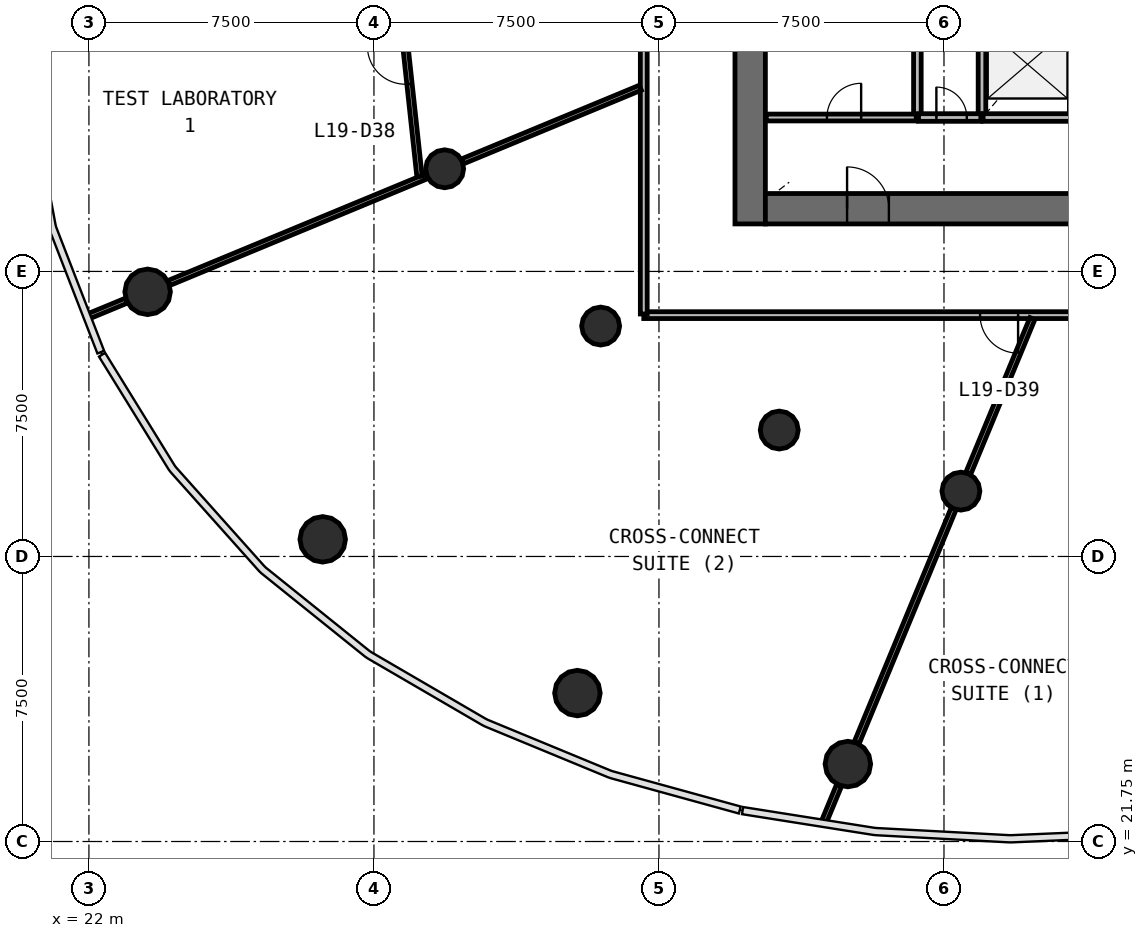
"""IFC4 building model, lengths in metres.
Left out: names, types, materials, properties, quantities, classifications, styles, units other than length and angle.
Written with IfcOpenShell. Run it as: python <this file> out.ifc"""

import sys

from ifc_helpers import new_model, si_unit, direction, frame, frame_2d, origin, origin_2d, place, context, subcontext, project, spatial, rectangle, circle, extrude, source, transform, mapped, element, fill, save


model = new_model("IFC4")
c1 = context("Model", 3, precision=1e-05, world=origin(), true_north=direction((0.0, 1.0)))
c2 = subcontext(c1, "Body", "Model", "MODEL_VIEW")
j1 = project(units=[si_unit("LENGTHUNIT", "METRE"), si_unit("PLANEANGLEUNIT", "RADIAN")], contexts=[c1])
p1 = place(None, origin())
s1 = spatial("IfcSite", under=j1, at=p1, CompositionType="ELEMENT")
p2 = place(p1, origin())
s2 = spatial("IfcBuilding", under=s1, at=p2, CompositionType="ELEMENT")
p3 = place(p2, frame((0.0, 0.0, 83.9)))
s3 = spatial("IfcBuildingStorey", under=s2, at=p3, CompositionType="ELEMENT", Elevation=83.9)
p4 = place(p3, frame((39.4, 58.0, 0.0), z_axis=(0.0, 0.0, 1.0), x_axis=(0.0, -1.0, 0.0)))
e1 = element("IfcWall", 1, at=p4, inside=s3, PredefinedType="SHEAR", context=c2, shape_type="SweptSolid", body=[
    extrude(rectangle(XDim=20.0, YDim=0.8, at=frame_2d((10.0, 0.0))), origin(), (0.0, 0.0, 1.0), 4.1),
])
p5 = place(p4, frame((9.1, 0.0, 0.0)))
e2 = element("IfcOpeningElement", 2, at=p5, cuts=e1, PredefinedType="OPENING", context=c2, shape_type="SweptSolid", body=[
    extrude(rectangle(XDim=1.8, YDim=2.1, at=frame_2d((0.9, 1.05))), frame((0.0, 0.41, 0.0), z_axis=(0.0, -1.0, 0.0), x_axis=(1.0, 0.0, 0.0)), (0.0, 0.0, 1.0), 0.82),
])
p6 = place(p3, frame((39.8, 38.4, 0.0), z_axis=(0.0, 0.0, 1.0), x_axis=(1.0, 0.0, 0.0)))
e3 = element("IfcWall", 3, at=p6, inside=s3, PredefinedType="SHEAR", context=c2, shape_type="SweptSolid", body=[
    extrude(rectangle(XDim=24.4, YDim=0.8, at=frame_2d((12.2, 0.0))), origin(), (0.0, 0.0, 1.0), 4.1),
])
p7 = place(p6, frame((21.65, 0.0, 0.0)))
e4 = element("IfcOpeningElement", 4, at=p7, cuts=e3, PredefinedType="OPENING", context=c2, shape_type="SweptSolid", body=[
    extrude(rectangle(XDim=1.1, YDim=2.1, at=frame_2d((0.55, 1.05))), frame((0.0, 0.41, 0.0), z_axis=(0.0, -1.0, 0.0), x_axis=(1.0, 0.0, 0.0)), (0.0, 0.0, 1.0), 0.82),
])
p8 = place(p6, frame((2.15, 0.0, 0.0)))
e5 = element("IfcOpeningElement", 5, at=p8, cuts=e3, PredefinedType="OPENING", context=c2, shape_type="SweptSolid", body=[
    extrude(rectangle(XDim=1.1, YDim=2.1, at=frame_2d((0.55, 1.05))), frame((0.0, 0.41, 0.0), z_axis=(0.0, -1.0, 0.0), x_axis=(1.0, 0.0, 0.0)), (0.0, 0.0, 1.0), 0.82),
])
m1 = source(origin(), c2, "Body", "SweptSolid", [
    extrude(circle(Radius=0.6, at=origin_2d()), origin(), (0.0, 0.0, 1.0), 4.1),
])
for number, where, z_axis, x_axis in (
    (6, (23.544, 36.213, 0.0), (0.0, 0.0, 1.0), (1.0, 0.0, 0.0)),
    (7, (28.152, 29.701, 0.0), (0.0, 0.0, 1.0), (1.0, 0.0, 0.0)),
    (8, (34.854, 25.655, 0.0), (0.0, 0.0, 1.0), (1.0, 0.0, 0.0)),
    (9, (41.971, 23.788, 0.0), (0.0, 0.0, 1.0), (1.0, 0.0, 0.0)),
):
    element("IfcColumn", number, at=place(p3, frame(where, z_axis=z_axis, x_axis=x_axis)), inside=s3, PredefinedType="COLUMN", context=c2, shape_type="MappedRepresentation", body=[
        mapped(m1, transform((0.0, 0.0, 0.0), scale=1.0)),
    ])
m2 = source(origin(), c2, "Body", "SweptSolid", [
    extrude(circle(Radius=0.5, at=origin_2d()), origin(), (0.0, 0.0, 1.0), 4.1),
])
for number, where, z_axis, x_axis in (
    (10, (31.361, 39.451, 0.0), (0.0, 0.0, 1.0), (1.0, 0.0, 0.0)),
    (11, (35.465, 35.312, 0.0), (0.0, 0.0, 1.0), (1.0, 0.0, 0.0)),
    (12, (40.165, 32.576, 0.0), (0.0, 0.0, 1.0), (1.0, 0.0, 0.0)),
    (13, (44.945, 30.969, 0.0), (0.0, 0.0, 1.0), (1.0, 0.0, 0.0)),
):
    element("IfcColumn", number, at=place(p3, frame(where, z_axis=z_axis, x_axis=x_axis)), inside=s3, PredefinedType="COLUMN", context=c2, shape_type="MappedRepresentation", body=[
        mapped(m2, transform((0.0, 0.0, 0.0), scale=1.0)),
    ])
for number, where, z_axis, x_axis in (
    (14, (43.8, 43.6, 0.0), (0.0, 0.0, 1.0), (0.0, -1.0, 0.0)),
    (15, (45.5, 43.6, 0.0), (0.0, 0.0, 1.0), (0.0, -1.0, 0.0)),
):
    element("IfcWall", number, at=place(p3, frame(where, z_axis=z_axis, x_axis=x_axis)), inside=s3, PredefinedType="SOLIDWALL", context=c2, shape_type="SweptSolid", body=[
        extrude(rectangle(XDim=2.8, YDim=0.2, at=frame_2d((1.4, 0.0))), origin(), (0.0, 0.0, 1.0), 3.7),
    ])
p9 = place(p3, frame((45.53, 40.8, 0.0), z_axis=(0.0, 0.0, 1.0), x_axis=(1.0, 0.0, 0.0)))
e16 = element("IfcWall", 16, at=p9, inside=s3, PredefinedType="SOLIDWALL", context=c2, shape_type="SweptSolid", body=[
    extrude(rectangle(XDim=2.34, YDim=0.2, at=frame_2d((1.17, 0.0))), origin(), (0.0, 0.0, 1.0), 3.7),
])
p10 = place(p3, frame((43.83, 40.8, 0.0), z_axis=(0.0, 0.0, 1.0), x_axis=(1.0, 0.0, 0.0)))
e17 = element("IfcWall", 17, at=p10, inside=s3, PredefinedType="SOLIDWALL", context=c2, shape_type="SweptSolid", body=[
    extrude(rectangle(XDim=1.64, YDim=0.2, at=frame_2d((0.82, 0.0))), origin(), (0.0, 0.0, 1.0), 3.7),
])
p11 = place(p10, frame((0.47, 0.0, 0.0)))
e18 = element("IfcOpeningElement", 18, at=p11, cuts=e17, PredefinedType="OPENING", context=c2, shape_type="SweptSolid", body=[
    extrude(rectangle(XDim=0.8, YDim=2.1, at=frame_2d((0.4, 1.05))), frame((0.0, 0.11, 0.0), z_axis=(0.0, -1.0, 0.0), x_axis=(1.0, 0.0, 0.0)), (0.0, 0.0, 1.0), 0.22),
])
p12 = place(p3, frame((67.4, 35.6, 0.0), z_axis=(0.0, 0.0, 1.0), x_axis=(-1.0, 0.0, 0.0)))
e19 = element("IfcWall", 19, at=p12, inside=s3, PredefinedType="PARTITIONING", context=c2, shape_type="SweptSolid", body=[
    extrude(rectangle(XDim=30.8, YDim=0.18, at=frame_2d((15.4, 0.0))), origin(), (0.0, 0.0, 1.0), 2.9),
])
p13 = place(p12, frame((20.95, 0.0, 0.0)))
e20 = element("IfcOpeningElement", 20, at=p13, cuts=e19, PredefinedType="OPENING", context=c2, shape_type="SweptSolid", body=[
    extrude(rectangle(XDim=1.0, YDim=2.1, at=frame_2d((0.5, 1.05))), frame((0.0, 0.1, 0.0), z_axis=(0.0, -1.0, 0.0), x_axis=(1.0, 0.0, 0.0)), (0.0, 0.0, 1.0), 0.2),
])
p14 = place(p12, frame((17.35, 0.0, 0.0)))
e21 = element("IfcOpeningElement", 21, at=p14, cuts=e19, PredefinedType="OPENING", context=c2, shape_type="SweptSolid", body=[
    extrude(rectangle(XDim=1.0, YDim=2.1, at=frame_2d((0.5, 1.05))), frame((0.0, 0.1, 0.0), z_axis=(0.0, -1.0, 0.0), x_axis=(1.0, 0.0, 0.0)), (0.0, 0.0, 1.0), 0.2),
])
p15 = place(p12, frame((14.95, 0.0, 0.0)))
e22 = element("IfcOpeningElement", 22, at=p15, cuts=e19, PredefinedType="OPENING", context=c2, shape_type="SweptSolid", body=[
    extrude(rectangle(XDim=1.0, YDim=2.1, at=frame_2d((0.5, 1.05))), frame((0.0, 0.1, 0.0), z_axis=(0.0, -1.0, 0.0), x_axis=(1.0, 0.0, 0.0)), (0.0, 0.0, 1.0), 0.2),
])
p16 = place(p3, frame((36.6, 35.63, 0.0), z_axis=(0.0, 0.0, 1.0), x_axis=(0.0, 1.0, 0.0)))
e23 = element("IfcWall", 23, at=p16, inside=s3, PredefinedType="PARTITIONING", context=c2, shape_type="SweptSolid", body=[
    extrude(rectangle(XDim=23.583, YDim=0.18, at=frame_2d((11.791, 0.0))), origin(), (0.0, 0.0, 1.0), 2.9),
])
p17 = place(p16, frame((11.333, 0.0, 0.0)))
e24 = element("IfcOpeningElement", 24, at=p17, cuts=e23, PredefinedType="OPENING", context=c2, shape_type="SweptSolid", body=[
    extrude(rectangle(XDim=1.0, YDim=2.1, at=frame_2d((0.5, 1.05))), frame((0.0, 0.1, 0.0), z_axis=(0.0, -1.0, 0.0), x_axis=(1.0, 0.0, 0.0)), (0.0, 0.0, 1.0), 0.2),
])
p18 = place(p3, frame((39.82, 40.8, 0.0), z_axis=(0.0, 0.0, 1.0), x_axis=(1.0, 0.0, 0.0)))
e25 = element("IfcWall", 25, at=p18, inside=s3, PredefinedType="PARTITIONING", context=c2, shape_type="SweptSolid", body=[
    extrude(rectangle(XDim=3.95, YDim=0.18, at=frame_2d((1.975, 0.0))), origin(), (0.0, 0.0, 1.0), 3.7),
])
p19 = place(p18, frame((1.6, 0.0, 0.0)))
e26 = element("IfcOpeningElement", 26, at=p19, cuts=e25, PredefinedType="OPENING", context=c2, shape_type="SweptSolid", body=[
    extrude(rectangle(XDim=0.9, YDim=2.1, at=frame_2d((0.45, 1.05))), frame((0.0, 0.1, 0.0), z_axis=(0.0, -1.0, 0.0), x_axis=(1.0, 0.0, 0.0)), (0.0, 0.0, 1.0), 0.2),
])
p20 = place(p3, frame((24.104, 36.445, 0.0), z_axis=(0.0, 0.0, 1.0), x_axis=(0.923867037115, 0.382713597528, 0.0)))
e27 = element("IfcWall", 27, at=p20, inside=s3, PredefinedType="PARTITIONING", context=c2, shape_type="SweptSolid", body=[
    extrude(rectangle(XDim=7.35, YDim=0.14, at=frame_2d((3.675, 0.0))), origin(), (0.0, 0.0, 1.0), 2.9),
])
p21 = place(p3, frame((44.752, 30.502, 0.0), z_axis=(0.0, 0.0, 1.0), x_axis=(-0.382696989205, -0.923873916968, 0.0)))
e28 = element("IfcWall", 28, at=p21, inside=s3, PredefinedType="PARTITIONING", context=c2, shape_type="SweptSolid", body=[
    extrude(rectangle(XDim=6.663, YDim=0.14, at=frame_2d((3.332, 0.0))), origin(), (0.0, 0.0, 1.0), 2.9),
])
p22 = place(p3, frame((30.698, 39.252, 0.0), z_axis=(0.0, 0.0, 1.0), x_axis=(-0.107698733289, 0.99418357603, 0.0)))
e29 = element("IfcWall", 29, at=p22, inside=s3, PredefinedType="PARTITIONING", context=c2, shape_type="SweptSolid", body=[
    extrude(rectangle(XDim=5.894, YDim=0.14, at=frame_2d((2.947, 0.0))), origin(), (0.0, 0.0, 1.0), 2.9),
])
p23 = place(p22, frame((2.444, 0.0, 0.0)))
e30 = element("IfcOpeningElement", 30, at=p23, cuts=e29, PredefinedType="OPENING", context=c2, shape_type="SweptSolid", body=[
    extrude(rectangle(XDim=1.0, YDim=2.1, at=frame_2d((0.5, 1.05))), frame((0.0, 0.08, 0.0), z_axis=(0.0, -1.0, 0.0), x_axis=(1.0, 0.0, 0.0)), (0.0, 0.0, 1.0), 0.16),
])
p24 = place(p3, frame((31.827, 39.644, 0.0), z_axis=(0.0, 0.0, 1.0), x_axis=(0.923890025086, 0.382658100067, 0.0)))
e31 = element("IfcWall", 31, at=p24, inside=s3, PredefinedType="PARTITIONING", context=c2, shape_type="SweptSolid", body=[
    extrude(rectangle(XDim=5.068, YDim=0.14, at=frame_2d((2.534, 0.0))), origin(), (0.0, 0.0, 1.0), 2.9),
])
p25 = place(p3, frame((46.826, 35.51, 0.0), z_axis=(0.0, 0.0, 1.0), x_axis=(-0.382672831764, -0.923883923353, 0.0)))
e32 = element("IfcWall", 32, at=p25, inside=s3, PredefinedType="PARTITIONING", context=c2, shape_type="SweptSolid", body=[
    extrude(rectangle(XDim=4.41, YDim=0.14, at=frame_2d((2.205, 0.0))), origin(), (0.0, 0.0, 1.0), 2.9),
])
p26 = place(p3, frame((22.986, 35.982, 0.0), z_axis=(0.0, 0.0, 1.0), x_axis=(-0.923961481624, -0.382485529758, 0.0)))
e33 = element("IfcWall", 33, at=p26, inside=s3, PredefinedType="PARTITIONING", context=c2, shape_type="SweptSolid", body=[
    extrude(rectangle(XDim=1.075, YDim=0.14, at=frame_2d((0.538, 0.0))), origin(), (0.0, 0.0, 1.0), 2.9),
])
p27 = place(p3, frame((41.74, 23.229, 0.0), z_axis=(0.0, 0.0, 1.0), x_axis=(-0.382620326534, -0.923905669278, 0.0)))
e34 = element("IfcWall", 34, at=p27, inside=s3, PredefinedType="PARTITIONING", context=c2, shape_type="SweptSolid", body=[
    extrude(rectangle(XDim=1.017, YDim=0.14, at=frame_2d((0.509, 0.0))), origin(), (0.0, 0.0, 1.0), 2.9),
])
m3 = source(origin(), c2, "Body", "SweptSolid", [
    extrude(rectangle(XDim=0.8, YDim=2.1, at=frame_2d((0.4, 1.05))), frame((0.0, 0.025, 0.0), z_axis=(0.0, -1.0, 0.0), x_axis=(1.0, 0.0, 0.0)), (0.0, 0.0, 1.0), 0.05),
])
p28 = place(p11, origin())
e35 = element("IfcDoor", 35, at=p28, inside=s3, OperationType="SINGLE_SWING_LEFT", PredefinedType="DOOR", context=c2, shape_type="MappedRepresentation", body=[
    mapped(m3, transform((0.0, 0.0, 0.0), scale=1.0)),
])
fill(e18, e35)
m4 = source(origin(), c2, "Body", "SweptSolid", [
    extrude(rectangle(XDim=1.1, YDim=2.1, at=frame_2d((0.55, 1.05))), frame((0.0, 0.025, 0.0), z_axis=(0.0, -1.0, 0.0), x_axis=(1.0, 0.0, 0.0)), (0.0, 0.0, 1.0), 0.05),
])
p29 = place(p8, origin())
e36 = element("IfcDoor", 36, at=p29, inside=s3, OperationType="SINGLE_SWING_LEFT", PredefinedType="DOOR", context=c2, shape_type="MappedRepresentation", body=[
    mapped(m4, transform((0.0, 0.0, 0.0), scale=1.0)),
])
fill(e5, e36)
m5 = source(origin(), c2, "Body", "SweptSolid", [
    extrude(rectangle(XDim=1.0, YDim=2.1, at=frame_2d((0.5, 1.05))), frame((0.0, 0.025, 0.0), z_axis=(0.0, -1.0, 0.0), x_axis=(1.0, 0.0, 0.0)), (0.0, 0.0, 1.0), 0.05),
])
p30 = place(p23, origin())
e37 = element("IfcDoor", 37, at=p30, inside=s3, OperationType="SINGLE_SWING_RIGHT", PredefinedType="DOOR", context=c2, shape_type="MappedRepresentation", body=[
    mapped(m5, transform((0.0, 0.0, 0.0), scale=1.0)),
])
fill(e30, e37)
p31 = place(p13, origin())
e38 = element("IfcDoor", 38, at=p31, inside=s3, OperationType="SINGLE_SWING_LEFT", PredefinedType="DOOR", context=c2, shape_type="MappedRepresentation", body=[
    mapped(m5, transform((0.0, 0.0, 0.0), scale=1.0)),
])
fill(e20, e38)
m6 = source(origin(), c2, "Body", "SweptSolid", [
    extrude(rectangle(XDim=0.9, YDim=2.1, at=frame_2d((0.45, 1.05))), frame((0.0, 0.025, 0.0), z_axis=(0.0, -1.0, 0.0), x_axis=(1.0, 0.0, 0.0)), (0.0, 0.0, 1.0), 0.05),
])
p32 = place(p19, origin())
e39 = element("IfcDoor", 39, at=p32, inside=s3, OperationType="SINGLE_SWING_RIGHT", PredefinedType="DOOR", context=c2, shape_type="MappedRepresentation", body=[
    mapped(m6, transform((0.0, 0.0, 0.0), scale=1.0)),
])
fill(e26, e39)
save(model, sys.argv[1])
